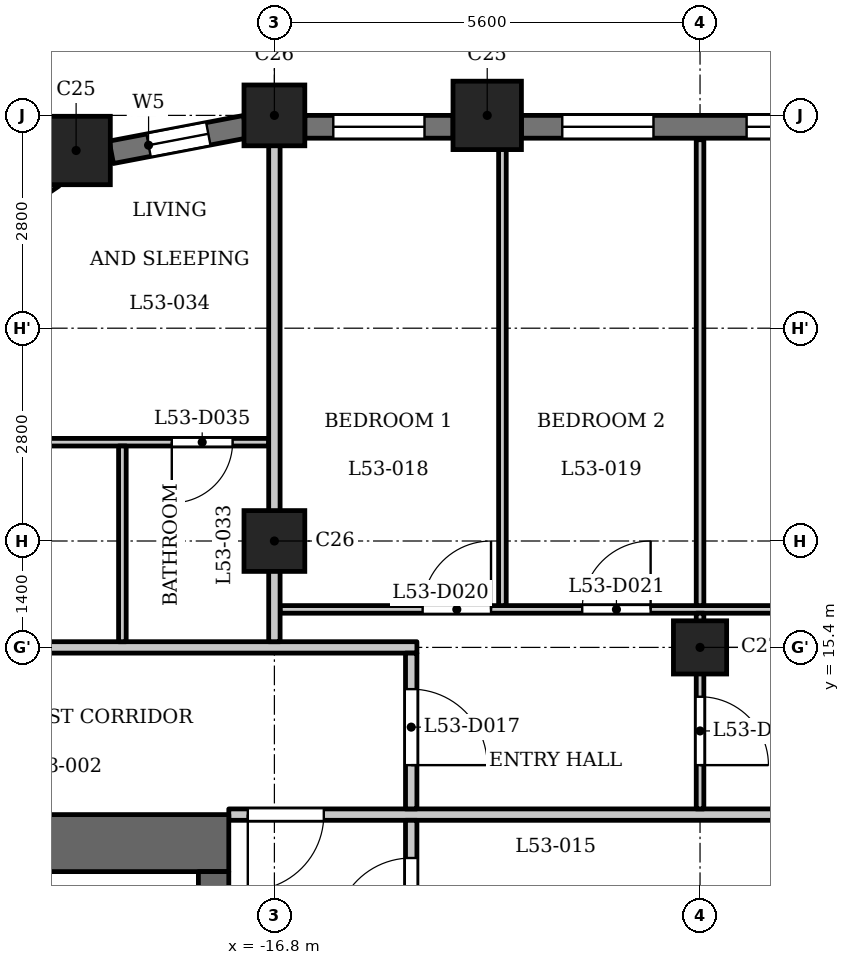
"""IFC4 building model, lengths in metres.
Left out: names, types, materials, properties, quantities, classifications, styles, units other than length and angle.
Written with IfcOpenShell. Run it as: python <this file> out.ifc"""

import sys

from ifc_helpers import new_model, si_unit, direction, frame, frame_2d, origin, origin_2d, place, context, subcontext, project, spatial, rectangle, extrude, element, fill, save


model = new_model("IFC4")
c1 = context("Model", 3, precision=1e-05, world=origin(), true_north=direction((0.0, 1.0)))
c2 = subcontext(c1, "Body", "Model", "MODEL_VIEW")
j1 = project(units=[si_unit("LENGTHUNIT", "METRE"), si_unit("PLANEANGLEUNIT", "RADIAN")], contexts=[c1])
p1 = place(None, origin())
s1 = spatial("IfcSite", under=j1, at=p1, CompositionType="ELEMENT")
p2 = place(p1, origin())
s2 = spatial("IfcBuilding", under=s1, at=p2, CompositionType="ELEMENT")
p3 = place(p2, frame((0.0, 0.0, 206.4)))
s3 = spatial("IfcBuildingStorey", under=s2, at=p3, CompositionType="ELEMENT", Elevation=206.4)
for number, where, z_axis, x_axis in (
    (1, (-14.0, 22.4, 0.0), (0.0, 0.0, 1.0), (1.0, 0.0, 0.0)),
    (2, (-19.409, 21.938, 0.0), (0.0, 0.0, 1.0), (1.0, 0.0, 0.0)),
):
    element("IfcColumn", number, at=place(p3, frame(where, z_axis=z_axis, x_axis=x_axis)), inside=s3, PredefinedType="COLUMN", context=c2, shape_type="SweptSolid", body=[
        extrude(rectangle(XDim=0.9, YDim=0.9, at=origin_2d()), origin(), (0.0, 0.0, 1.0), 3.5),
    ])
for number, where, z_axis, x_axis in (
    (3, (-16.8, 16.8, 0.0), (0.0, 0.0, 1.0), (1.0, 0.0, 0.0)),
    (4, (-16.8, 22.4, 0.0), (0.0, 0.0, 1.0), (1.0, 0.0, 0.0)),
):
    element("IfcColumn", number, at=place(p3, frame(where, z_axis=z_axis, x_axis=x_axis)), inside=s3, PredefinedType="COLUMN", context=c2, shape_type="SweptSolid", body=[
        extrude(rectangle(XDim=0.8, YDim=0.8, at=origin_2d()), origin(), (0.0, 0.0, 1.0), 3.5),
    ])
p4 = place(p3, frame((-11.2, 15.4, 0.0), z_axis=(0.0, 0.0, 1.0), x_axis=(1.0, 0.0, 0.0)))
e5 = element("IfcColumn", 5, at=p4, inside=s3, PredefinedType="COLUMN", context=c2, shape_type="SweptSolid", body=[
    extrude(rectangle(XDim=0.7, YDim=0.7, at=origin_2d()), origin(), (0.0, 0.0, 1.0), 3.5),
])
p5 = place(p3, frame((-8.85, 22.25, 0.0), z_axis=(0.0, 0.0, 1.0), x_axis=(-1.0, 0.0, 0.0)))
e6 = element("IfcWall", 6, at=p5, inside=s3, PredefinedType="SOLIDWALL", context=c2, shape_type="SweptSolid", body=[
    extrude(rectangle(XDim=4.7, YDim=0.3, at=frame_2d((2.35, 0.0))), origin(), (0.0, 0.0, 1.0), 2.5),
])
p6 = place(p5, frame((0.538, 0.0, 0.6)))
e7 = element("IfcOpeningElement", 7, at=p6, cuts=e6, PredefinedType="OPENING", context=c2, shape_type="SweptSolid", body=[
    extrude(rectangle(XDim=1.2, YDim=1.55, at=frame_2d((0.6, 0.775))), frame((0.0, 0.16, 0.0), z_axis=(0.0, -1.0, 0.0), x_axis=(1.0, 0.0, 0.0)), (0.0, 0.0, 1.0), 0.32),
])
p7 = place(p5, frame((2.962, 0.0, 0.6)))
e8 = element("IfcOpeningElement", 8, at=p7, cuts=e6, PredefinedType="OPENING", context=c2, shape_type="SweptSolid", body=[
    extrude(rectangle(XDim=1.2, YDim=1.55, at=frame_2d((0.6, 0.775))), frame((0.0, 0.16, 0.0), z_axis=(0.0, -1.0, 0.0), x_axis=(1.0, 0.0, 0.0)), (0.0, 0.0, 1.0), 0.32),
])
p8 = place(p3, frame((-14.45, 22.25, 0.0), z_axis=(0.0, 0.0, 1.0), x_axis=(-1.0, 0.0, 0.0)))
e9 = element("IfcWall", 9, at=p8, inside=s3, PredefinedType="SOLIDWALL", context=c2, shape_type="SweptSolid", body=[
    extrude(rectangle(XDim=1.95, YDim=0.3, at=frame_2d((0.975, 0.0))), origin(), (0.0, 0.0, 1.0), 2.5),
])
p9 = place(p8, frame((0.375, 0.0, 0.6)))
e10 = element("IfcOpeningElement", 10, at=p9, cuts=e9, PredefinedType="OPENING", context=c2, shape_type="SweptSolid", body=[
    extrude(rectangle(XDim=1.2, YDim=1.55, at=frame_2d((0.6, 0.775))), frame((0.0, 0.16, 0.0), z_axis=(0.0, -1.0, 0.0), x_axis=(1.0, 0.0, 0.0)), (0.0, 0.0, 1.0), 0.32),
])
p10 = place(p3, frame((-17.179, 22.251, 0.0), z_axis=(0.0, 0.0, 1.0), x_axis=(-0.98230529033, -0.187286722942, 0.0)))
e11 = element("IfcWall", 11, at=p10, inside=s3, PredefinedType="SOLIDWALL", context=c2, shape_type="SweptSolid", body=[
    extrude(rectangle(XDim=1.799, YDim=0.3, at=frame_2d((0.899, 0.0))), origin(), (0.0, 0.0, 1.0), 2.5),
])
p11 = place(p10, frame((0.5, 0.0, 0.6)))
e12 = element("IfcOpeningElement", 12, at=p11, cuts=e11, PredefinedType="OPENING", context=c2, shape_type="SweptSolid", body=[
    extrude(rectangle(XDim=0.8, YDim=1.55, at=frame_2d((0.4, 0.775))), frame((0.0, 0.16, 0.0), z_axis=(0.0, -1.0, 0.0), x_axis=(1.0, 0.0, 0.0)), (0.0, 0.0, 1.0), 0.32),
])
p12 = place(p3, frame((-19.719, 21.594, 0.0), z_axis=(0.0, 0.0, 1.0), x_axis=(-0.827067282455, -0.562102935673, 0.0)))
e13 = element("IfcWall", 13, at=p12, inside=s3, PredefinedType="SOLIDWALL", context=c2, shape_type="SweptSolid", body=[
    extrude(rectangle(XDim=1.806, YDim=0.3, at=frame_2d((0.903, 0.0))), origin(), (0.0, 0.0, 1.0), 2.5),
])
p13 = place(p12, frame((0.503, 0.0, 0.6)))
e14 = element("IfcOpeningElement", 14, at=p13, cuts=e13, PredefinedType="OPENING", context=c2, shape_type="SweptSolid", body=[
    extrude(rectangle(XDim=0.8, YDim=1.55, at=frame_2d((0.4, 0.775))), frame((0.0, 0.16, 0.0), z_axis=(0.0, -1.0, 0.0), x_axis=(1.0, 0.0, 0.0)), (0.0, 0.0, 1.0), 0.32),
])
p14 = place(p3, frame((-17.4, 12.825, 0.0), z_axis=(0.0, 0.0, 1.0), x_axis=(-1.0, 0.0, 0.0)))
e15 = element("IfcWall", 15, at=p14, inside=s3, PredefinedType="SHEAR", context=c2, shape_type="SweptSolid", body=[
    extrude(rectangle(XDim=7.6, YDim=0.75, at=frame_2d((3.8, 0.0))), origin(), (0.0, 0.0, 1.0), 3.2),
])
p15 = place(p3, frame((-17.6, -12.45, 0.0), z_axis=(0.0, 0.0, 1.0), x_axis=(0.0, 1.0, 0.0)))
e16 = element("IfcWall", 16, at=p15, inside=s3, PredefinedType="SHEAR", context=c2, shape_type="SweptSolid", body=[
    extrude(rectangle(XDim=24.9, YDim=0.4, at=frame_2d((12.45, 0.0))), origin(), (0.0, 0.0, 1.0), 3.2),
])
p16 = place(p15, frame((8.65, 0.0, 0.0)))
e17 = element("IfcOpeningElement", 17, at=p16, cuts=e16, PredefinedType="OPENING", context=c2, shape_type="SweptSolid", body=[
    extrude(rectangle(XDim=0.9, YDim=2.1, at=frame_2d((0.45, 1.05))), frame((0.0, 0.21, 0.0), z_axis=(0.0, -1.0, 0.0), x_axis=(1.0, 0.0, 0.0)), (0.0, 0.0, 1.0), 0.42),
])
p17 = place(p15, frame((15.6, 0.0, 0.0)))
e18 = element("IfcOpeningElement", 18, at=p17, cuts=e16, PredefinedType="OPENING", context=c2, shape_type="SweptSolid", body=[
    extrude(rectangle(XDim=1.1, YDim=2.1, at=frame_2d((0.55, 1.05))), frame((0.0, 0.21, 0.0), z_axis=(0.0, -1.0, 0.0), x_axis=(1.0, 0.0, 0.0)), (0.0, 0.0, 1.0), 0.42),
])
p18 = place(p15, frame((18.0, 0.0, 0.0)))
e19 = element("IfcOpeningElement", 19, at=p18, cuts=e16, PredefinedType="OPENING", context=c2, shape_type="SweptSolid", body=[
    extrude(rectangle(XDim=1.1, YDim=2.1, at=frame_2d((0.55, 1.05))), frame((0.0, 0.21, 0.0), z_axis=(0.0, -1.0, 0.0), x_axis=(1.0, 0.0, 0.0)), (0.0, 0.0, 1.0), 0.42),
])
p19 = place(p15, frame((23.025, 0.0, 0.0)))
e20 = element("IfcOpeningElement", 20, at=p19, cuts=e16, PredefinedType="OPENING", context=c2, shape_type="SweptSolid", body=[
    extrude(rectangle(XDim=1.1, YDim=2.1, at=frame_2d((0.55, 1.05))), frame((0.0, 0.21, 0.0), z_axis=(0.0, -1.0, 0.0), x_axis=(1.0, 0.0, 0.0)), (0.0, 0.0, 1.0), 0.42),
])
p20 = place(p15, frame((0.775, 0.0, 0.0)))
e21 = element("IfcOpeningElement", 21, at=p20, cuts=e16, PredefinedType="OPENING", context=c2, shape_type="SweptSolid", body=[
    extrude(rectangle(XDim=1.1, YDim=2.1, at=frame_2d((0.55, 1.05))), frame((0.0, 0.21, 0.0), z_axis=(0.0, -1.0, 0.0), x_axis=(1.0, 0.0, 0.0)), (0.0, 0.0, 1.0), 0.42),
])
p21 = place(p15, frame((12.925, 0.0, 0.0)))
e22 = element("IfcOpeningElement", 22, at=p21, cuts=e16, PredefinedType="OPENING", context=c2, shape_type="SweptSolid", body=[
    extrude(rectangle(XDim=1.8, YDim=2.1, at=frame_2d((0.9, 1.05))), frame((0.0, 0.21, 0.0), z_axis=(0.0, -1.0, 0.0), x_axis=(1.0, 0.0, 0.0)), (0.0, 0.0, 1.0), 0.42),
])
p22 = place(p3, frame((-17.4, 13.2, 0.0), z_axis=(0.0, 0.0, 1.0), x_axis=(1.0, 0.0, 0.0)))
e23 = element("IfcWall", 23, at=p22, inside=s3, PredefinedType="PARTITIONING", context=c2, shape_type="SweptSolid", body=[
    extrude(rectangle(XDim=34.8, YDim=0.15, at=frame_2d((17.4, 0.0))), origin(), (0.0, 0.0, 1.0), 3.2),
])
p23 = place(p22, frame((0.25, 0.0, 0.0)))
e24 = element("IfcOpeningElement", 24, at=p23, cuts=e23, PredefinedType="OPENING", context=c2, shape_type="SweptSolid", body=[
    extrude(rectangle(XDim=1.0, YDim=2.1, at=frame_2d((0.5, 1.05))), frame((0.0, 0.085, 0.0), z_axis=(0.0, -1.0, 0.0), x_axis=(1.0, 0.0, 0.0)), (0.0, 0.0, 1.0), 0.17),
])
p24 = place(p22, frame((33.65, 0.0, 0.0)))
e25 = element("IfcOpeningElement", 25, at=p24, cuts=e23, PredefinedType="OPENING", context=c2, shape_type="SweptSolid", body=[
    extrude(rectangle(XDim=1.0, YDim=2.1, at=frame_2d((0.5, 1.05))), frame((0.0, 0.085, 0.0), z_axis=(0.0, -1.0, 0.0), x_axis=(1.0, 0.0, 0.0)), (0.0, 0.0, 1.0), 0.17),
])
p25 = place(p3, frame((-24.684, 15.4, 0.0), z_axis=(0.0, 0.0, 1.0), x_axis=(1.0, 0.0, 0.0)))
e26 = element("IfcWall", 26, at=p25, inside=s3, PredefinedType="PARTITIONING", context=c2, shape_type="SweptSolid", body=[
    extrude(rectangle(XDim=9.759, YDim=0.15, at=frame_2d((4.879, 0.0))), origin(), (0.0, 0.0, 1.0), 3.2),
])
p26 = place(p25, frame((0.984, 0.0, 0.0)))
e27 = element("IfcOpeningElement", 27, at=p26, cuts=e26, PredefinedType="OPENING", context=c2, shape_type="SweptSolid", body=[
    extrude(rectangle(XDim=1.0, YDim=2.1, at=frame_2d((0.5, 1.05))), frame((0.0, 0.085, 0.0), z_axis=(0.0, -1.0, 0.0), x_axis=(1.0, 0.0, 0.0)), (0.0, 0.0, 1.0), 0.17),
])
p27 = place(p3, frame((-16.725, 15.9, 0.0), z_axis=(0.0, 0.0, 1.0), x_axis=(1.0, 0.0, 0.0)))
e28 = element("IfcWall", 28, at=p27, inside=s3, PredefinedType="PARTITIONING", context=c2, shape_type="SweptSolid", body=[
    extrude(rectangle(XDim=33.45, YDim=0.1, at=frame_2d((16.725, 0.0))), origin(), (0.0, 0.0, 1.0), 3.2),
])
p28 = place(p27, frame((1.875, 0.0, 0.0)))
e29 = element("IfcOpeningElement", 29, at=p28, cuts=e28, PredefinedType="OPENING", context=c2, shape_type="SweptSolid", body=[
    extrude(rectangle(XDim=0.9, YDim=2.1, at=frame_2d((0.45, 1.05))), frame((0.0, 0.06, 0.0), z_axis=(0.0, -1.0, 0.0), x_axis=(1.0, 0.0, 0.0)), (0.0, 0.0, 1.0), 0.12),
])
p29 = place(p27, frame((3.975, 0.0, 0.0)))
e30 = element("IfcOpeningElement", 30, at=p29, cuts=e28, PredefinedType="OPENING", context=c2, shape_type="SweptSolid", body=[
    extrude(rectangle(XDim=0.9, YDim=2.1, at=frame_2d((0.45, 1.05))), frame((0.0, 0.06, 0.0), z_axis=(0.0, -1.0, 0.0), x_axis=(1.0, 0.0, 0.0)), (0.0, 0.0, 1.0), 0.12),
])
p30 = place(p27, frame((6.825, 0.0, 0.0)))
e31 = element("IfcOpeningElement", 31, at=p30, cuts=e28, PredefinedType="OPENING", context=c2, shape_type="SweptSolid", body=[
    extrude(rectangle(XDim=0.9, YDim=2.1, at=frame_2d((0.45, 1.05))), frame((0.0, 0.06, 0.0), z_axis=(0.0, -1.0, 0.0), x_axis=(1.0, 0.0, 0.0)), (0.0, 0.0, 1.0), 0.12),
])
p31 = place(p27, frame((28.975, 0.0, 0.0)))
e32 = element("IfcOpeningElement", 32, at=p31, cuts=e28, PredefinedType="OPENING", context=c2, shape_type="SweptSolid", body=[
    extrude(rectangle(XDim=0.9, YDim=2.1, at=frame_2d((0.45, 1.05))), frame((0.0, 0.06, 0.0), z_axis=(0.0, -1.0, 0.0), x_axis=(1.0, 0.0, 0.0)), (0.0, 0.0, 1.0), 0.12),
])
p32 = place(p27, frame((30.725, 0.0, 0.0)))
e33 = element("IfcOpeningElement", 33, at=p32, cuts=e28, PredefinedType="OPENING", context=c2, shape_type="SweptSolid", body=[
    extrude(rectangle(XDim=0.9, YDim=2.1, at=frame_2d((0.45, 1.05))), frame((0.0, 0.06, 0.0), z_axis=(0.0, -1.0, 0.0), x_axis=(1.0, 0.0, 0.0)), (0.0, 0.0, 1.0), 0.12),
])
p33 = place(p27, frame((25.625, 0.0, 0.0)))
e34 = element("IfcOpeningElement", 34, at=p33, cuts=e28, PredefinedType="OPENING", context=c2, shape_type="SweptSolid", body=[
    extrude(rectangle(XDim=0.9, YDim=2.1, at=frame_2d((0.45, 1.05))), frame((0.0, 0.06, 0.0), z_axis=(0.0, -1.0, 0.0), x_axis=(1.0, 0.0, 0.0)), (0.0, 0.0, 1.0), 0.12),
])
p34 = place(p3, frame((-23.64, 18.1, 0.0), z_axis=(0.0, 0.0, 1.0), x_axis=(1.0, 0.0, 0.0)))
e35 = element("IfcWall", 35, at=p34, inside=s3, PredefinedType="PARTITIONING", context=c2, shape_type="SweptSolid", body=[
    extrude(rectangle(XDim=6.765, YDim=0.1, at=frame_2d((3.382, 0.0))), origin(), (0.0, 0.0, 1.0), 3.2),
])
p35 = place(p34, frame((5.49, 0.0, 0.0)))
e36 = element("IfcOpeningElement", 36, at=p35, cuts=e35, PredefinedType="OPENING", context=c2, shape_type="SweptSolid", body=[
    extrude(rectangle(XDim=0.8, YDim=2.1, at=frame_2d((0.4, 1.05))), frame((0.0, 0.06, 0.0), z_axis=(0.0, -1.0, 0.0), x_axis=(1.0, 0.0, 0.0)), (0.0, 0.0, 1.0), 0.12),
])
p36 = place(p34, frame((1.29, 0.0, 0.0)))
e37 = element("IfcOpeningElement", 37, at=p36, cuts=e35, PredefinedType="OPENING", context=c2, shape_type="SweptSolid", body=[
    extrude(rectangle(XDim=0.9, YDim=2.1, at=frame_2d((0.45, 1.05))), frame((0.0, 0.06, 0.0), z_axis=(0.0, -1.0, 0.0), x_axis=(1.0, 0.0, 0.0)), (0.0, 0.0, 1.0), 0.12),
])
p37 = place(p3, frame((-18.8, 15.475, 0.0), z_axis=(0.0, 0.0, 1.0), x_axis=(0.0, 1.0, 0.0)))
e38 = element("IfcWall", 38, at=p37, inside=s3, PredefinedType="PARTITIONING", context=c2, shape_type="SweptSolid", body=[
    extrude(rectangle(XDim=2.575, YDim=0.1, at=frame_2d((1.288, 0.0))), origin(), (0.0, 0.0, 1.0), 3.2),
])
p38 = place(p3, frame((-16.8, 15.475, 0.0), z_axis=(0.0, 0.0, 1.0), x_axis=(0.0, 1.0, 0.0)))
e39 = element("IfcWall", 39, at=p38, inside=s3, PredefinedType="PARTITIONING", context=c2, shape_type="SweptSolid", body=[
    extrude(rectangle(XDim=6.835, YDim=0.15, at=frame_2d((3.417, 0.0))), origin(), (0.0, 0.0, 1.0), 2.55),
])
p39 = place(p3, frame((-15.0, 6.769, 0.0), z_axis=(0.0, 0.0, 1.0), x_axis=(0.0, 1.0, 0.0)))
e40 = element("IfcWall", 40, at=p39, inside=s3, PredefinedType="PARTITIONING", context=c2, shape_type="SweptSolid", body=[
    extrude(rectangle(XDim=6.356, YDim=0.15, at=frame_2d((3.178, 0.0))), origin(), (0.0, 0.0, 1.0), 3.2),
])
p40 = place(p39, frame((4.86, 0.0, 0.0)))
e41 = element("IfcOpeningElement", 41, at=p40, cuts=e40, PredefinedType="OPENING", context=c2, shape_type="SweptSolid", body=[
    extrude(rectangle(XDim=1.0, YDim=2.1, at=frame_2d((0.5, 1.05))), frame((0.0, 0.085, 0.0), z_axis=(0.0, -1.0, 0.0), x_axis=(1.0, 0.0, 0.0)), (0.0, 0.0, 1.0), 0.17),
])
p41 = place(p3, frame((-15.0, 13.275, 0.0), z_axis=(0.0, 0.0, 1.0), x_axis=(0.0, 1.0, 0.0)))
e42 = element("IfcWall", 42, at=p41, inside=s3, PredefinedType="PARTITIONING", context=c2, shape_type="SweptSolid", body=[
    extrude(rectangle(XDim=2.05, YDim=0.15, at=frame_2d((1.025, 0.0))), origin(), (0.0, 0.0, 1.0), 3.2),
])
p42 = place(p41, frame((0.576, 0.0, 0.0)))
e43 = element("IfcOpeningElement", 43, at=p42, cuts=e42, PredefinedType="OPENING", context=c2, shape_type="SweptSolid", body=[
    extrude(rectangle(XDim=1.0, YDim=2.1, at=frame_2d((0.5, 1.05))), frame((0.0, 0.085, 0.0), z_axis=(0.0, -1.0, 0.0), x_axis=(1.0, 0.0, 0.0)), (0.0, 0.0, 1.0), 0.17),
])
p43 = place(p3, frame((-13.8, 15.95, 0.0), z_axis=(0.0, 0.0, 1.0), x_axis=(0.0, 1.0, 0.0)))
e44 = element("IfcWall", 44, at=p43, inside=s3, PredefinedType="PARTITIONING", context=c2, shape_type="SweptSolid", body=[
    extrude(rectangle(XDim=6.88, YDim=0.1, at=frame_2d((3.44, 0.0))), origin(), (0.0, 0.0, 1.0), 3.2),
])
p44 = place(p3, frame((-11.2, 13.275, 0.0), z_axis=(0.0, 0.0, 1.0), x_axis=(0.0, 1.0, 0.0)))
e45 = element("IfcWall", 45, at=p44, inside=s3, PredefinedType="PARTITIONING", context=c2, shape_type="SweptSolid", body=[
    extrude(rectangle(XDim=2.575, YDim=0.1, at=frame_2d((1.288, 0.0))), origin(), (0.0, 0.0, 1.0), 3.2),
])
p45 = place(p44, frame((0.576, 0.0, 0.0)))
e46 = element("IfcOpeningElement", 46, at=p45, cuts=e45, PredefinedType="OPENING", context=c2, shape_type="SweptSolid", body=[
    extrude(rectangle(XDim=0.9, YDim=2.1, at=frame_2d((0.45, 1.05))), frame((0.0, 0.06, 0.0), z_axis=(0.0, -1.0, 0.0), x_axis=(1.0, 0.0, 0.0)), (0.0, 0.0, 1.0), 0.12),
])
p46 = place(p3, frame((-11.2, 15.95, 0.0), z_axis=(0.0, 0.0, 1.0), x_axis=(0.0, 1.0, 0.0)))
e47 = element("IfcWall", 47, at=p46, inside=s3, PredefinedType="PARTITIONING", context=c2, shape_type="SweptSolid", body=[
    extrude(rectangle(XDim=6.13, YDim=0.1, at=frame_2d((3.065, 0.0))), origin(), (0.0, 0.0, 1.0), 3.2),
])
p47 = place(p40, origin())
e48 = element("IfcDoor", 48, at=p47, inside=s3, OperationType="SINGLE_SWING_RIGHT", PredefinedType="DOOR", context=c2, shape_type="SweptSolid", body=[
    extrude(rectangle(XDim=1.0, YDim=2.1, at=frame_2d((0.5, 1.05))), frame((0.0, 0.025, 0.0), z_axis=(0.0, -1.0, 0.0), x_axis=(1.0, 0.0, 0.0)), (0.0, 0.0, 1.0), 0.05),
])
fill(e41, e48)
p48 = place(p23, origin())
e49 = element("IfcDoor", 49, at=p48, inside=s3, OperationType="SINGLE_SWING_LEFT", PredefinedType="DOOR", context=c2, shape_type="SweptSolid", body=[
    extrude(rectangle(XDim=1.0, YDim=2.1, at=frame_2d((0.5, 1.05))), frame((0.0, 0.025, 0.0), z_axis=(0.0, -1.0, 0.0), x_axis=(1.0, 0.0, 0.0)), (0.0, 0.0, 1.0), 0.05),
])
fill(e24, e49)
p49 = place(p42, origin())
e50 = element("IfcDoor", 50, at=p49, inside=s3, OperationType="SINGLE_SWING_LEFT", PredefinedType="DOOR", context=c2, shape_type="SweptSolid", body=[
    extrude(rectangle(XDim=1.0, YDim=2.1, at=frame_2d((0.5, 1.05))), frame((0.0, 0.025, 0.0), z_axis=(0.0, -1.0, 0.0), x_axis=(1.0, 0.0, 0.0)), (0.0, 0.0, 1.0), 0.05),
])
fill(e43, e50)
p50 = place(p45, origin())
e51 = element("IfcDoor", 51, at=p50, inside=s3, OperationType="SINGLE_SWING_LEFT", PredefinedType="DOOR", context=c2, shape_type="SweptSolid", body=[
    extrude(rectangle(XDim=0.9, YDim=2.1, at=frame_2d((0.45, 1.05))), frame((0.0, 0.025, 0.0), z_axis=(0.0, -1.0, 0.0), x_axis=(1.0, 0.0, 0.0)), (0.0, 0.0, 1.0), 0.05),
])
fill(e46, e51)
p51 = place(p28, origin())
e52 = element("IfcDoor", 52, at=p51, inside=s3, OperationType="SINGLE_SWING_LEFT", PredefinedType="DOOR", context=c2, shape_type="SweptSolid", body=[
    extrude(rectangle(XDim=0.9, YDim=2.1, at=frame_2d((0.45, 1.05))), frame((0.0, 0.025, 0.0), z_axis=(0.0, -1.0, 0.0), x_axis=(1.0, 0.0, 0.0)), (0.0, 0.0, 1.0), 0.05),
])
fill(e29, e52)
p52 = place(p29, origin())
e53 = element("IfcDoor", 53, at=p52, inside=s3, OperationType="SINGLE_SWING_LEFT", PredefinedType="DOOR", context=c2, shape_type="SweptSolid", body=[
    extrude(rectangle(XDim=0.9, YDim=2.1, at=frame_2d((0.45, 1.05))), frame((0.0, 0.025, 0.0), z_axis=(0.0, -1.0, 0.0), x_axis=(1.0, 0.0, 0.0)), (0.0, 0.0, 1.0), 0.05),
])
fill(e30, e53)
p53 = place(p35, origin())
e54 = element("IfcDoor", 54, at=p53, inside=s3, OperationType="SINGLE_SWING_LEFT", PredefinedType="DOOR", context=c2, shape_type="SweptSolid", body=[
    extrude(rectangle(XDim=0.8, YDim=2.1, at=frame_2d((0.4, 1.05))), frame((0.0, 0.025, 0.0), z_axis=(0.0, -1.0, 0.0), x_axis=(1.0, 0.0, 0.0)), (0.0, 0.0, 1.0), 0.05),
])
fill(e36, e54)
p54 = place(p6, origin())
e55 = element("IfcWindow", 55, at=p54, inside=s3, PartitioningType="SINGLE_PANEL", PredefinedType="WINDOW", context=c2, shape_type="SweptSolid", body=[
    extrude(rectangle(XDim=1.2, YDim=1.55, at=frame_2d((0.6, 0.775))), frame((0.0, 0.03, 0.0), z_axis=(0.0, -1.0, 0.0), x_axis=(1.0, 0.0, 0.0)), (0.0, 0.0, 1.0), 0.06),
])
fill(e7, e55)
p55 = place(p7, origin())
e56 = element("IfcWindow", 56, at=p55, inside=s3, PartitioningType="SINGLE_PANEL", PredefinedType="WINDOW", context=c2, shape_type="SweptSolid", body=[
    extrude(rectangle(XDim=1.2, YDim=1.55, at=frame_2d((0.6, 0.775))), frame((0.0, 0.03, 0.0), z_axis=(0.0, -1.0, 0.0), x_axis=(1.0, 0.0, 0.0)), (0.0, 0.0, 1.0), 0.06),
])
fill(e8, e56)
p56 = place(p9, origin())
e57 = element("IfcWindow", 57, at=p56, inside=s3, PartitioningType="SINGLE_PANEL", PredefinedType="WINDOW", context=c2, shape_type="SweptSolid", body=[
    extrude(rectangle(XDim=1.2, YDim=1.55, at=frame_2d((0.6, 0.775))), frame((0.0, 0.03, 0.0), z_axis=(0.0, -1.0, 0.0), x_axis=(1.0, 0.0, 0.0)), (0.0, 0.0, 1.0), 0.06),
])
fill(e10, e57)
p57 = place(p11, origin())
e58 = element("IfcWindow", 58, at=p57, inside=s3, PartitioningType="SINGLE_PANEL", PredefinedType="WINDOW", context=c2, shape_type="SweptSolid", body=[
    extrude(rectangle(XDim=0.8, YDim=1.55, at=frame_2d((0.4, 0.775))), frame((0.0, 0.03, 0.0), z_axis=(0.0, -1.0, 0.0), x_axis=(1.0, 0.0, 0.0)), (0.0, 0.0, 1.0), 0.06),
])
fill(e12, e58)
save(model, sys.argv[1])
